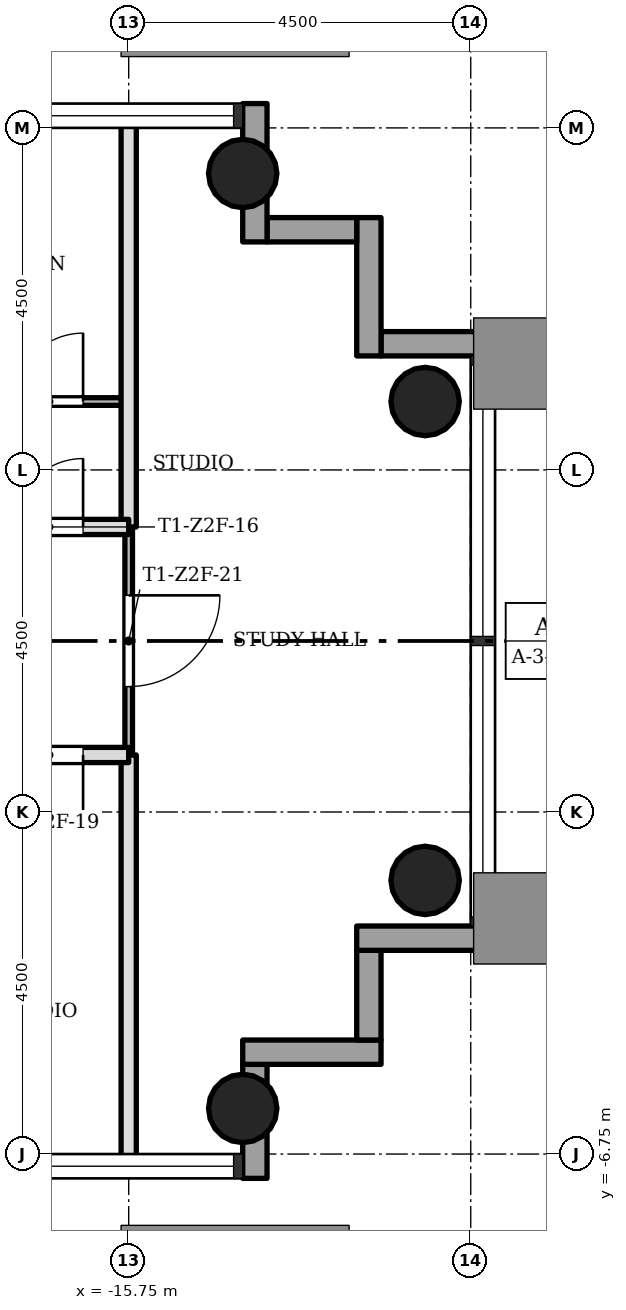
"""IFC4 building model, lengths in metres.
Left out: names, types, materials, properties, quantities, classifications, styles, units other than length and angle.
Written with IfcOpenShell. Run it as: python <this file> out.ifc"""

import sys

from ifc_helpers import new_model, si_unit, direction, frame, frame_2d, origin, origin_2d, place, context, subcontext, project, spatial, rectangle, hollow_circle, extrude, element, fill, save


model = new_model("IFC4")
c1 = context("Model", 3, precision=1e-05, world=origin(), true_north=direction((0.0, 1.0)))
c2 = subcontext(c1, "Body", "Model", "MODEL_VIEW")
j1 = project(units=[si_unit("LENGTHUNIT", "METRE"), si_unit("PLANEANGLEUNIT", "RADIAN")], contexts=[c1])
p1 = place(None, origin())
s1 = spatial("IfcSite", under=j1, at=p1, CompositionType="ELEMENT")
p2 = place(p1, origin())
s2 = spatial("IfcBuilding", under=s1, at=p2, CompositionType="ELEMENT")
p3 = place(p2, frame((0.0, 0.0, 114.0)))
s3 = spatial("IfcBuildingStorey", under=s2, at=p3, CompositionType="ELEMENT", Elevation=114.0)
for number, where, z_axis, x_axis in (
    (1, (-14.25, -6.15, 0.0), (0.0, 0.0, 1.0), (1.0, 0.0, 0.0)),
    (2, (-14.25, 6.15, 0.0), (0.0, 0.0, 1.0), (1.0, 0.0, 0.0)),
    (3, (-11.85, -3.15, 0.0), (0.0, 0.0, 1.0), (1.0, 0.0, 0.0)),
    (4, (-11.85, 3.15, 0.0), (0.0, 0.0, 1.0), (1.0, 0.0, 0.0)),
):
    element("IfcColumn", number, at=place(p3, frame(where, z_axis=z_axis, x_axis=x_axis)), inside=s3, PredefinedType="COLUMN", context=c2, shape_type="SweptSolid", body=[
        extrude(hollow_circle(Radius=0.45, WallThickness=0.032, at=origin_2d()), origin(), (0.0, 0.0, 1.0), 3.4),
    ])
p4 = place(p3, frame((-14.09, -7.07, -0.3), z_axis=(0.0, 0.0, 1.0), x_axis=(0.0, 1.0, 0.0)))
e5 = element("IfcWall", 5, at=p4, inside=s3, PredefinedType="STANDARD", context=c2, shape_type="SweptSolid", body=[
    extrude(rectangle(XDim=1.5, YDim=0.32, at=frame_2d((0.75, 0.0))), origin(), (0.0, 0.0, 1.0), 3.4),
])
p5 = place(p3, frame((-14.25, -5.41, -0.3), z_axis=(0.0, 0.0, 1.0), x_axis=(1.0, 0.0, 0.0)))
e6 = element("IfcWall", 6, at=p5, inside=s3, PredefinedType="STANDARD", context=c2, shape_type="SweptSolid", body=[
    extrude(rectangle(XDim=1.82, YDim=0.32, at=frame_2d((0.91, 0.0))), origin(), (0.0, 0.0, 1.0), 3.4),
])
p6 = place(p3, frame((-12.59, -5.25, -0.3), z_axis=(0.0, 0.0, 1.0), x_axis=(0.0, 1.0, 0.0)))
e7 = element("IfcWall", 7, at=p6, inside=s3, PredefinedType="STANDARD", context=c2, shape_type="SweptSolid", body=[
    extrude(rectangle(XDim=1.18, YDim=0.32, at=frame_2d((0.59, 0.0))), origin(), (0.0, 0.0, 1.0), 3.4),
])
p7 = place(p3, frame((-12.75, -3.91, -0.3), z_axis=(0.0, 0.0, 1.0), x_axis=(1.0, 0.0, 0.0)))
e8 = element("IfcWall", 8, at=p7, inside=s3, PredefinedType="STANDARD", context=c2, shape_type="SweptSolid", body=[
    extrude(rectangle(XDim=1.82, YDim=0.32, at=frame_2d((0.91, 0.0))), origin(), (0.0, 0.0, 1.0), 3.4),
])
p8 = place(p3, frame((-10.93, 3.91, -0.3), z_axis=(0.0, 0.0, 1.0), x_axis=(-1.0, 0.0, 0.0)))
e9 = element("IfcWall", 9, at=p8, inside=s3, PredefinedType="STANDARD", context=c2, shape_type="SweptSolid", body=[
    extrude(rectangle(XDim=1.5, YDim=0.32, at=frame_2d((0.75, 0.0))), origin(), (0.0, 0.0, 1.0), 3.4),
])
p9 = place(p3, frame((-12.59, 3.75, -0.3), z_axis=(0.0, 0.0, 1.0), x_axis=(0.0, 1.0, 0.0)))
e10 = element("IfcWall", 10, at=p9, inside=s3, PredefinedType="STANDARD", context=c2, shape_type="SweptSolid", body=[
    extrude(rectangle(XDim=1.82, YDim=0.32, at=frame_2d((0.91, 0.0))), origin(), (0.0, 0.0, 1.0), 3.4),
])
p10 = place(p3, frame((-12.75, 5.41, -0.3), z_axis=(0.0, 0.0, 1.0), x_axis=(-1.0, 0.0, 0.0)))
e11 = element("IfcWall", 11, at=p10, inside=s3, PredefinedType="STANDARD", context=c2, shape_type="SweptSolid", body=[
    extrude(rectangle(XDim=1.18, YDim=0.32, at=frame_2d((0.59, 0.0))), origin(), (0.0, 0.0, 1.0), 3.4),
])
p11 = place(p3, frame((-14.09, 5.25, -0.3), z_axis=(0.0, 0.0, 1.0), x_axis=(0.0, 1.0, 0.0)))
e12 = element("IfcWall", 12, at=p11, inside=s3, PredefinedType="STANDARD", context=c2, shape_type="SweptSolid", body=[
    extrude(rectangle(XDim=1.82, YDim=0.32, at=frame_2d((0.91, 0.0))), origin(), (0.0, 0.0, 1.0), 3.4),
])
p12 = place(p3, frame((-15.75, -1.5, 0.0), z_axis=(0.0, 0.0, 1.0), x_axis=(0.0, 1.0, 0.0)))
e13 = element("IfcWall", 13, at=p12, inside=s3, PredefinedType="PARTITIONING", context=c2, shape_type="SweptSolid", body=[
    extrude(rectangle(XDim=3.0, YDim=0.1, at=frame_2d((1.5, 0.0))), origin(), (0.0, 0.0, 1.0), 3.0),
])
p13 = place(p12, frame((0.9, 0.0, 0.0)))
e14 = element("IfcOpeningElement", 14, at=p13, cuts=e13, PredefinedType="OPENING", context=c2, shape_type="SweptSolid", body=[
    extrude(rectangle(XDim=1.2, YDim=2.1, at=frame_2d((0.6, 1.05))), frame((0.0, 0.06, 0.0), z_axis=(0.0, -1.0, 0.0), x_axis=(1.0, 0.0, 0.0)), (0.0, 0.0, 1.0), 0.12),
])
for number, where, z_axis, x_axis in (
    (15, (-15.75, -6.85, 0.0), (0.0, 0.0, 1.0), (0.0, 1.0, 0.0)),
    (16, (-15.75, 1.5, 0.0), (0.0, 0.0, 1.0), (0.0, 1.0, 0.0)),
):
    element("IfcWall", number, at=place(p3, frame(where, z_axis=z_axis, x_axis=x_axis)), inside=s3, PredefinedType="SOLIDWALL", context=c2, shape_type="SweptSolid", body=[
        extrude(rectangle(XDim=5.35, YDim=0.2, at=frame_2d((2.675, 0.0))), origin(), (0.0, 0.0, 1.0), 3.0),
    ])
p14 = place(p3, frame((-20.25, -1.5, 0.0), z_axis=(0.0, 0.0, 1.0), x_axis=(1.0, 0.0, 0.0)))
e17 = element("IfcWall", 17, at=p14, inside=s3, PredefinedType="SOLIDWALL", context=c2, shape_type="SweptSolid", body=[
    extrude(rectangle(XDim=4.5, YDim=0.2, at=frame_2d((2.25, 0.0))), origin(), (0.0, 0.0, 1.0), 3.0),
])
p15 = place(p14, frame((3.0, 0.0, 0.0)))
e18 = element("IfcOpeningElement", 18, at=p15, cuts=e17, PredefinedType="OPENING", context=c2, shape_type="SweptSolid", body=[
    extrude(rectangle(XDim=0.9, YDim=2.1, at=frame_2d((0.45, 1.05))), frame((0.0, 0.11, 0.0), z_axis=(0.0, -1.0, 0.0), x_axis=(1.0, 0.0, 0.0)), (0.0, 0.0, 1.0), 0.22),
])
p16 = place(p3, frame((-20.25, 1.5, 0.0), z_axis=(0.0, 0.0, 1.0), x_axis=(1.0, 0.0, 0.0)))
e19 = element("IfcWall", 19, at=p16, inside=s3, PredefinedType="SOLIDWALL", context=c2, shape_type="SweptSolid", body=[
    extrude(rectangle(XDim=4.5, YDim=0.2, at=frame_2d((2.25, 0.0))), origin(), (0.0, 0.0, 1.0), 3.0),
])
p17 = place(p16, frame((3.0, 0.0, 0.0)))
e20 = element("IfcOpeningElement", 20, at=p17, cuts=e19, PredefinedType="OPENING", context=c2, shape_type="SweptSolid", body=[
    extrude(rectangle(XDim=0.9, YDim=2.1, at=frame_2d((0.45, 1.05))), frame((0.0, 0.11, 0.0), z_axis=(0.0, -1.0, 0.0), x_axis=(1.0, 0.0, 0.0)), (0.0, 0.0, 1.0), 0.22),
])
p18 = place(p3, frame((-20.25, 3.15, 0.0), z_axis=(0.0, 0.0, 1.0), x_axis=(1.0, 0.0, 0.0)))
e21 = element("IfcWall", 21, at=p18, inside=s3, PredefinedType="PARTITIONING", context=c2, shape_type="SweptSolid", body=[
    extrude(rectangle(XDim=4.5, YDim=0.1, at=frame_2d((2.25, 0.0))), origin(), (0.0, 0.0, 1.0), 3.0),
])
p19 = place(p18, frame((3.0, 0.0, 0.0)))
e22 = element("IfcOpeningElement", 22, at=p19, cuts=e21, PredefinedType="OPENING", context=c2, shape_type="SweptSolid", body=[
    extrude(rectangle(XDim=0.9, YDim=2.1, at=frame_2d((0.45, 1.05))), frame((0.0, 0.06, 0.0), z_axis=(0.0, -1.0, 0.0), x_axis=(1.0, 0.0, 0.0)), (0.0, 0.0, 1.0), 0.12),
])
p20 = place(p17, origin())
e23 = element("IfcDoor", 23, at=p20, inside=s3, OperationType="SINGLE_SWING_LEFT", PredefinedType="DOOR", context=c2, shape_type="SweptSolid", body=[
    extrude(rectangle(XDim=0.9, YDim=2.1, at=frame_2d((0.45, 1.05))), frame((0.0, 0.025, 0.0), z_axis=(0.0, -1.0, 0.0), x_axis=(1.0, 0.0, 0.0)), (0.0, 0.0, 1.0), 0.05),
])
fill(e20, e23)
p21 = place(p19, origin())
e24 = element("IfcDoor", 24, at=p21, inside=s3, OperationType="SINGLE_SWING_LEFT", PredefinedType="DOOR", context=c2, shape_type="SweptSolid", body=[
    extrude(rectangle(XDim=0.9, YDim=2.1, at=frame_2d((0.45, 1.05))), frame((0.0, 0.025, 0.0), z_axis=(0.0, -1.0, 0.0), x_axis=(1.0, 0.0, 0.0)), (0.0, 0.0, 1.0), 0.05),
])
fill(e22, e24)
p22 = place(p15, origin())
e25 = element("IfcDoor", 25, at=p22, inside=s3, OperationType="SINGLE_SWING_RIGHT", PredefinedType="DOOR", context=c2, shape_type="SweptSolid", body=[
    extrude(rectangle(XDim=0.9, YDim=2.1, at=frame_2d((0.45, 1.05))), frame((0.0, 0.025, 0.0), z_axis=(0.0, -1.0, 0.0), x_axis=(1.0, 0.0, 0.0)), (0.0, 0.0, 1.0), 0.05),
])
fill(e18, e25)
p23 = place(p13, origin())
e26 = element("IfcDoor", 26, at=p23, inside=s3, OperationType="SINGLE_SWING_RIGHT", PredefinedType="DOOR", context=c2, shape_type="SweptSolid", body=[
    extrude(rectangle(XDim=1.2, YDim=2.1, at=frame_2d((0.6, 1.05))), frame((0.0, 0.025, 0.0), z_axis=(0.0, -1.0, 0.0), x_axis=(1.0, 0.0, 0.0)), (0.0, 0.0, 1.0), 0.05),
])
fill(e14, e26)
save(model, sys.argv[1])
